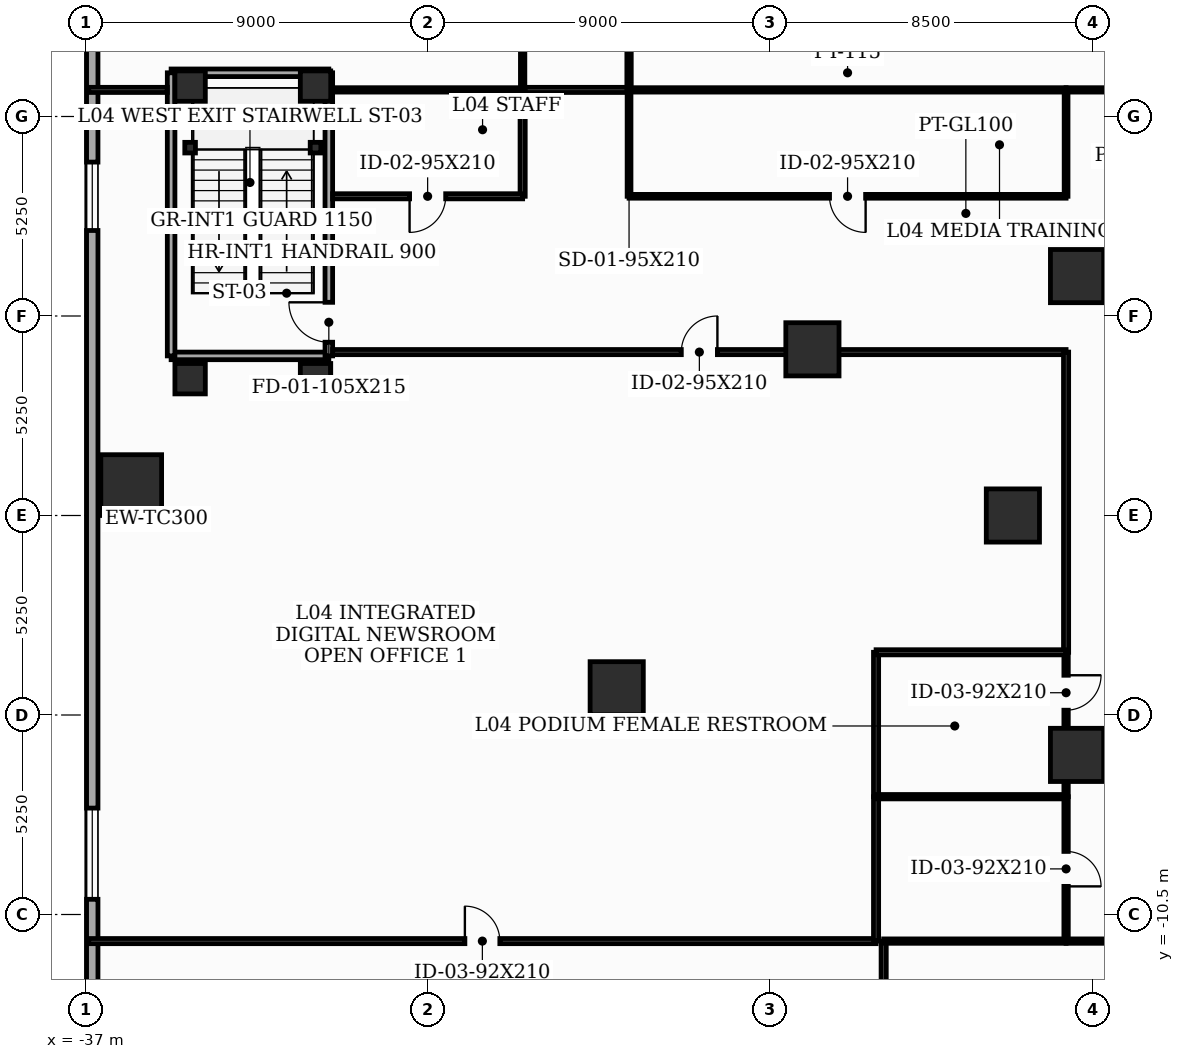
"""IFC4 building model, lengths in metres.
Left out: names, types, materials, properties, quantities, classifications, styles, units other than length and angle.
Written with IfcOpenShell. Run it as: python <this file> out.ifc"""

import sys

from ifc_helpers import new_model, si_unit, direction, frame, frame_2d, origin, origin_2d, place, context, subcontext, project, spatial, rectangle, i_section, extrude, element, fill, save


model = new_model("IFC4")
c1 = context("Model", 3, precision=1e-05, world=origin(), true_north=direction((0.0, 1.0)))
c2 = subcontext(c1, "Body", "Model", "MODEL_VIEW")
j1 = project(units=[si_unit("LENGTHUNIT", "METRE"), si_unit("PLANEANGLEUNIT", "RADIAN")], contexts=[c1])
p1 = place(None, origin())
s1 = spatial("IfcSite", under=j1, at=p1, CompositionType="ELEMENT")
p2 = place(p1, origin())
s2 = spatial("IfcBuilding", under=s1, at=p2, CompositionType="ELEMENT")
p3 = place(p2, frame((0.0, 0.0, 20.8)))
s3 = spatial("IfcBuildingStorey", under=s2, at=p3, CompositionType="ELEMENT", Elevation=20.8)
for number, where, z_axis, x_axis in (
    (1, (-10.912, 6.3, 0.0), (0.0, 0.0, 1.0), (1.0, 0.0, 0.0)),
    (2, (-12.6, 0.0, 0.0), (0.0, 0.0, 1.0), (1.0, 0.0, 0.0)),
    (3, (-10.912, -6.3, 0.0), (0.0, 0.0, 1.0), (1.0, 0.0, 0.0)),
):
    element("IfcColumn", number, at=place(p3, frame(where, z_axis=z_axis, x_axis=x_axis)), inside=s3, PredefinedType="COLUMN", context=c2, shape_type="SweptSolid", body=[
        extrude(rectangle(XDim=1.4, YDim=1.4, at=origin_2d()), origin(), (0.0, 0.0, 1.0), 5.2),
    ])
p4 = place(p3, frame((-35.8, 0.8, 0.0), z_axis=(0.0, 0.0, 1.0), x_axis=(1.0, 0.0, 0.0)))
e4 = element("IfcColumn", 4, at=p4, inside=s3, PredefinedType="COLUMN", context=c2, shape_type="SweptSolid", body=[
    extrude(rectangle(XDim=1.6, YDim=1.6, at=origin_2d()), origin(), (0.0, 0.0, 1.0), 5.2),
])
for number, where, z_axis, x_axis in (
    (5, (-17.875, 4.373, 0.0), (0.0, 0.0, 1.0), (1.0, 0.0, 0.0)),
    (6, (-23.025, -4.547, 0.0), (0.0, 0.0, 1.0), (1.0, 0.0, 0.0)),
):
    element("IfcColumn", number, at=place(p3, frame(where, z_axis=z_axis, x_axis=x_axis)), inside=s3, PredefinedType="COLUMN", context=c2, shape_type="SweptSolid", body=[
        extrude(rectangle(XDim=1.4, YDim=1.4, at=origin_2d()), origin(), (0.0, 0.0, 1.0), 5.2),
    ])
for number, where, z_axis, x_axis in (
    (7, (-34.25, 3.6, 0.0), (0.0, 0.0, 1.0), (1.0, 0.0, 0.0)),
    (8, (-30.95, 3.6, 0.0), (0.0, 0.0, 1.0), (1.0, 0.0, 0.0)),
    (9, (-30.95, 11.3, 0.0), (0.0, 0.0, 1.0), (1.0, 0.0, 0.0)),
    (10, (-34.25, 11.3, 0.0), (0.0, 0.0, 1.0), (1.0, 0.0, 0.0)),
):
    element("IfcColumn", number, at=place(p3, frame(where, z_axis=z_axis, x_axis=x_axis)), inside=s3, PredefinedType="COLUMN", context=c2, shape_type="SweptSolid", body=[
        extrude(rectangle(XDim=0.8, YDim=0.8, at=origin_2d()), origin(), (0.0, 0.0, 1.0), 5.2),
    ])
for number, where, z_axis, x_axis in (
    (11, (-34.25, 9.68, 0.0), (0.0, 0.0, 1.0), (1.0, 0.0, 0.0)),
    (12, (-30.95, 9.68, 0.0), (0.0, 0.0, 1.0), (1.0, 0.0, 0.0)),
):
    element("IfcColumn", number, at=place(p3, frame(where, z_axis=z_axis, x_axis=x_axis)), inside=s3, PredefinedType="PILASTER", context=c2, shape_type="SweptSolid", body=[
        extrude(i_section(OverallWidth=0.28, OverallDepth=0.28, WebThickness=0.01, FlangeThickness=0.018, at=origin_2d()), origin(), (0.0, 0.0, 1.0), 5.2),
    ])
p5 = place(p3, frame((-36.825, 28.5, 0.0), z_axis=(0.0, 0.0, 1.0), x_axis=(0.0, -1.0, 0.0)))
e13 = element("IfcWall", 13, at=p5, inside=s3, PredefinedType="SOLIDWALL", context=c2, shape_type="SweptSolid", body=[
    extrude(rectangle(XDim=48.0, YDim=0.3, at=frame_2d((24.0, 0.0))), origin(), (0.0, 0.0, 1.0), 4.94),
])
p6 = place(p5, frame((6.2, 0.0, 0.9)))
e14 = element("IfcOpeningElement", 14, at=p6, cuts=e13, PredefinedType="OPENING", context=c2, shape_type="SweptSolid", body=[
    extrude(rectangle(XDim=2.4, YDim=1.35, at=frame_2d((1.2, 0.675))), frame((0.0, 0.16, 0.0), z_axis=(0.0, -1.0, 0.0), x_axis=(1.0, 0.0, 0.0)), (0.0, 0.0, 1.0), 0.32),
])
p7 = place(p5, frame((19.2, 0.0, 0.9)))
e15 = element("IfcOpeningElement", 15, at=p7, cuts=e13, PredefinedType="OPENING", context=c2, shape_type="SweptSolid", body=[
    extrude(rectangle(XDim=1.8, YDim=1.35, at=frame_2d((0.9, 0.675))), frame((0.0, 0.16, 0.0), z_axis=(0.0, -1.0, 0.0), x_axis=(1.0, 0.0, 0.0)), (0.0, 0.0, 1.0), 0.32),
])
p8 = place(p5, frame((36.2, 0.0, 0.9)))
e16 = element("IfcOpeningElement", 16, at=p8, cuts=e13, PredefinedType="OPENING", context=c2, shape_type="SweptSolid", body=[
    extrude(rectangle(XDim=2.4, YDim=1.35, at=frame_2d((1.2, 0.675))), frame((0.0, 0.16, 0.0), z_axis=(0.0, -1.0, 0.0), x_axis=(1.0, 0.0, 0.0)), (0.0, 0.0, 1.0), 0.32),
])
p9 = place(p3, frame((-34.75, 4.2, 0.0), z_axis=(0.0, 0.0, 1.0), x_axis=(1.0, 0.0, 0.0)))
e17 = element("IfcWall", 17, at=p9, inside=s3, PredefinedType="SOLIDWALL", context=c2, shape_type="SweptSolid", body=[
    extrude(rectangle(XDim=4.15, YDim=0.2, at=frame_2d((2.075, 0.0))), origin(), (0.0, 0.0, 1.0), 4.94),
])
p10 = place(p3, frame((-30.6, 4.2, 0.0), z_axis=(0.0, 0.0, 1.0), x_axis=(0.0, 1.0, 0.0)))
e18 = element("IfcWall", 18, at=p10, inside=s3, PredefinedType="SOLIDWALL", context=c2, shape_type="SweptSolid", body=[
    extrude(rectangle(XDim=7.45, YDim=0.2, at=frame_2d((3.725, 0.0))), origin(), (0.0, 0.0, 1.0), 4.94),
])
p11 = place(p10, frame((0.36, 0.0, 0.0)))
e19 = element("IfcOpeningElement", 19, at=p11, cuts=e18, PredefinedType="OPENING", context=c2, shape_type="SweptSolid", body=[
    extrude(rectangle(XDim=1.05, YDim=2.15, at=frame_2d((0.525, 1.075))), frame((0.0, 0.11, 0.0), z_axis=(0.0, -1.0, 0.0), x_axis=(1.0, 0.0, 0.0)), (0.0, 0.0, 1.0), 0.22),
])
p12 = place(p3, frame((-30.6, 11.65, 0.0), z_axis=(0.0, 0.0, 1.0), x_axis=(-1.0, 0.0, 0.0)))
e20 = element("IfcWall", 20, at=p12, inside=s3, PredefinedType="SOLIDWALL", context=c2, shape_type="SweptSolid", body=[
    extrude(rectangle(XDim=4.15, YDim=0.2, at=frame_2d((2.075, 0.0))), origin(), (0.0, 0.0, 1.0), 4.94),
])
p13 = place(p3, frame((-34.75, 11.65, 0.0), z_axis=(0.0, 0.0, 1.0), x_axis=(0.0, -1.0, 0.0)))
e21 = element("IfcWall", 21, at=p13, inside=s3, PredefinedType="SOLIDWALL", context=c2, shape_type="SweptSolid", body=[
    extrude(rectangle(XDim=7.45, YDim=0.2, at=frame_2d((3.725, 0.0))), origin(), (0.0, 0.0, 1.0), 4.94),
])
p14 = place(p3, frame((-22.7, 11.2, 0.0), z_axis=(0.0, 0.0, 1.0), x_axis=(-1.0, 0.0, 0.0)))
e22 = element("IfcWall", 22, at=p14, inside=s3, PredefinedType="PARTITIONING", context=c2, shape_type="SweptSolid", body=[
    extrude(rectangle(XDim=2.8, YDim=0.135, at=frame_2d((1.4, 0.0))), origin(), (0.0, 0.0, 1.0), 4.94),
])
p15 = place(p3, frame((-30.5, 4.3, 0.0), z_axis=(0.0, 0.0, 1.0), x_axis=(1.0, 0.0, 0.0)))
e23 = element("IfcWall", 23, at=p15, inside=s3, PredefinedType="PARTITIONING", context=c2, shape_type="SweptSolid", body=[
    extrude(rectangle(XDim=19.3, YDim=0.135, at=frame_2d((9.65, 0.0))), origin(), (0.0, 0.0, 1.0), 3.525),
])
p16 = place(p15, frame((9.175, 0.0, 0.0)))
e24 = element("IfcOpeningElement", 24, at=p16, cuts=e23, PredefinedType="OPENING", context=c2, shape_type="SweptSolid", body=[
    extrude(rectangle(XDim=0.95, YDim=2.1, at=frame_2d((0.475, 1.05))), frame((0.0, 0.077, 0.0), z_axis=(0.0, -1.0, 0.0), x_axis=(1.0, 0.0, 0.0)), (0.0, 0.0, 1.0), 0.155),
])
p17 = place(p3, frame((-11.2, 4.3, 0.0), z_axis=(0.0, 0.0, 1.0), x_axis=(0.0, -1.0, 0.0)))
e25 = element("IfcWall", 25, at=p17, inside=s3, PredefinedType="PARTITIONING", context=c2, shape_type="SweptSolid", body=[
    extrude(rectangle(XDim=7.9, YDim=0.135, at=frame_2d((3.95, 0.0))), origin(), (0.0, 0.0, 1.0), 3.525),
])
p18 = place(p3, frame((-11.2, -3.6, 0.0), z_axis=(0.0, 0.0, 1.0), x_axis=(0.0, -1.0, 0.0)))
e26 = element("IfcWall", 26, at=p18, inside=s3, PredefinedType="PARTITIONING", context=c2, shape_type="SweptSolid", body=[
    extrude(rectangle(XDim=3.8, YDim=0.115, at=frame_2d((1.9, 0.0))), origin(), (0.0, 0.0, 1.0), 3.525),
])
p19 = place(p18, frame((0.604, 0.0, 0.0)))
e27 = element("IfcOpeningElement", 27, at=p19, cuts=e26, PredefinedType="OPENING", context=c2, shape_type="SweptSolid", body=[
    extrude(rectangle(XDim=0.92, YDim=2.1, at=frame_2d((0.46, 1.05))), frame((0.0, 0.067, 0.0), z_axis=(0.0, -1.0, 0.0), x_axis=(1.0, 0.0, 0.0)), (0.0, 0.0, 1.0), 0.135),
])
p20 = place(p3, frame((-11.2, -7.4, 0.0), z_axis=(0.0, 0.0, 1.0), x_axis=(0.0, -1.0, 0.0)))
e28 = element("IfcWall", 28, at=p20, inside=s3, PredefinedType="PARTITIONING", context=c2, shape_type="SweptSolid", body=[
    extrude(rectangle(XDim=3.8, YDim=0.115, at=frame_2d((1.9, 0.0))), origin(), (0.0, 0.0, 1.0), 4.94),
])
p21 = place(p20, frame((1.44, 0.0, 0.0)))
e29 = element("IfcOpeningElement", 29, at=p21, cuts=e28, PredefinedType="OPENING", context=c2, shape_type="SweptSolid", body=[
    extrude(rectangle(XDim=0.92, YDim=2.1, at=frame_2d((0.46, 1.05))), frame((0.0, 0.067, 0.0), z_axis=(0.0, -1.0, 0.0), x_axis=(1.0, 0.0, 0.0)), (0.0, 0.0, 1.0), 0.135),
])
p22 = place(p3, frame((-11.2, -11.2, 0.0), z_axis=(0.0, 0.0, 1.0), x_axis=(1.0, 0.0, 0.0)))
e30 = element("IfcWall", 30, at=p22, inside=s3, PredefinedType="PARTITIONING", context=c2, shape_type="SweptSolid", body=[
    extrude(rectangle(XDim=11.2, YDim=0.115, at=frame_2d((5.6, 0.0))), origin(), (0.0, 0.0, 1.0), 3.525),
])
p23 = place(p22, frame((7.589, 0.0, 0.0)))
e31 = element("IfcOpeningElement", 31, at=p23, cuts=e30, PredefinedType="OPENING", context=c2, shape_type="SweptSolid", body=[
    extrude(rectangle(XDim=0.95, YDim=2.1, at=frame_2d((0.475, 1.05))), frame((0.0, 0.067, 0.0), z_axis=(0.0, -1.0, 0.0), x_axis=(1.0, 0.0, 0.0)), (0.0, 0.0, 1.0), 0.135),
])
p24 = place(p3, frame((-10.0, 11.2, 0.0), z_axis=(0.0, 0.0, 1.0), x_axis=(-1.0, 0.0, 0.0)))
e32 = element("IfcWall", 32, at=p24, inside=s3, PredefinedType="PARTITIONING", context=c2, shape_type="SweptSolid", body=[
    extrude(rectangle(XDim=1.2, YDim=0.115, at=frame_2d((0.6, 0.0))), origin(), (0.0, 0.0, 1.0), 3.525),
])
p25 = place(p3, frame((-11.2, 11.2, 0.0), z_axis=(0.0, 0.0, 1.0), x_axis=(0.0, -1.0, 0.0)))
e33 = element("IfcWall", 33, at=p25, inside=s3, PredefinedType="MOVABLE", context=c2, shape_type="SweptSolid", body=[
    extrude(rectangle(XDim=2.8, YDim=0.1, at=frame_2d((1.4, 0.0))), origin(), (0.0, 0.0, 1.0), 3.525),
])
p26 = place(p3, frame((-11.2, 8.4, 0.0), z_axis=(0.0, 0.0, 1.0), x_axis=(-1.0, 0.0, 0.0)))
e34 = element("IfcWall", 34, at=p26, inside=s3, PredefinedType="MOVABLE", context=c2, shape_type="SweptSolid", body=[
    extrude(rectangle(XDim=11.5, YDim=0.1, at=frame_2d((5.75, 0.0))), origin(), (0.0, 0.0, 1.0), 3.525),
])
p27 = place(p26, frame((5.275, 0.0, 0.0)))
e35 = element("IfcOpeningElement", 35, at=p27, cuts=e34, PredefinedType="OPENING", context=c2, shape_type="SweptSolid", body=[
    extrude(rectangle(XDim=0.95, YDim=2.1, at=frame_2d((0.475, 1.05))), frame((0.0, 0.06, 0.0), z_axis=(0.0, -1.0, 0.0), x_axis=(1.0, 0.0, 0.0)), (0.0, 0.0, 1.0), 0.12),
])
p28 = place(p3, frame((-22.7, 8.4, 0.0), z_axis=(0.0, 0.0, 1.0), x_axis=(0.0, 1.0, 0.0)))
e36 = element("IfcWall", 36, at=p28, inside=s3, PredefinedType="MOVABLE", context=c2, shape_type="SweptSolid", body=[
    extrude(rectangle(XDim=2.8, YDim=0.1, at=frame_2d((1.4, 0.0))), origin(), (0.0, 0.0, 1.0), 4.94),
])
p29 = place(p3, frame((-25.5, 11.2, 0.0), z_axis=(0.0, 0.0, 1.0), x_axis=(0.0, -1.0, 0.0)))
e37 = element("IfcWall", 37, at=p29, inside=s3, PredefinedType="PARTITIONING", context=c2, shape_type="SweptSolid", body=[
    extrude(rectangle(XDim=2.8, YDim=0.135, at=frame_2d((1.4, 0.0))), origin(), (0.0, 0.0, 1.0), 4.94),
])
p30 = place(p3, frame((-25.5, 8.4, 0.0), z_axis=(0.0, 0.0, 1.0), x_axis=(-1.0, 0.0, 0.0)))
e38 = element("IfcWall", 38, at=p30, inside=s3, PredefinedType="PARTITIONING", context=c2, shape_type="SweptSolid", body=[
    extrude(rectangle(XDim=5.0, YDim=0.135, at=frame_2d((2.5, 0.0))), origin(), (0.0, 0.0, 1.0), 4.94),
])
p31 = place(p30, frame((2.025, 0.0, 0.0)))
e39 = element("IfcOpeningElement", 39, at=p31, cuts=e38, PredefinedType="OPENING", context=c2, shape_type="SweptSolid", body=[
    extrude(rectangle(XDim=0.95, YDim=2.1, at=frame_2d((0.475, 1.05))), frame((0.0, 0.077, 0.0), z_axis=(0.0, -1.0, 0.0), x_axis=(1.0, 0.0, 0.0)), (0.0, 0.0, 1.0), 0.155),
])
p32 = place(p3, frame((-25.5, 13.8, 0.0), z_axis=(0.0, 0.0, 1.0), x_axis=(0.0, -1.0, 0.0)))
e40 = element("IfcWall", 40, at=p32, inside=s3, PredefinedType="PARTITIONING", context=c2, shape_type="SweptSolid", body=[
    extrude(rectangle(XDim=2.6, YDim=0.115, at=frame_2d((1.3, 0.0))), origin(), (0.0, 0.0, 1.0), 4.425),
])
p33 = place(p3, frame((-22.7, 11.2, 0.0), z_axis=(0.0, 0.0, 1.0), x_axis=(0.0, 1.0, 0.0)))
e41 = element("IfcWall", 41, at=p33, inside=s3, PredefinedType="PARTITIONING", context=c2, shape_type="SweptSolid", body=[
    extrude(rectangle(XDim=7.0, YDim=0.115, at=frame_2d((3.5, 0.0))), origin(), (0.0, 0.0, 1.0), 4.425),
])
p34 = place(p33, frame((3.025, 0.0, 0.0)))
e42 = element("IfcOpeningElement", 42, at=p34, cuts=e41, PredefinedType="OPENING", context=c2, shape_type="SweptSolid", body=[
    extrude(rectangle(XDim=0.95, YDim=2.1, at=frame_2d((0.475, 1.05))), frame((0.0, 0.067, 0.0), z_axis=(0.0, -1.0, 0.0), x_axis=(1.0, 0.0, 0.0)), (0.0, 0.0, 1.0), 0.135),
])
p35 = place(p3, frame((-16.2, -7.4, 0.0), z_axis=(0.0, 0.0, 1.0), x_axis=(0.0, 1.0, 0.0)))
e43 = element("IfcWall", 43, at=p35, inside=s3, PredefinedType="PARTITIONING", context=c2, shape_type="SweptSolid", body=[
    extrude(rectangle(XDim=3.8, YDim=0.135, at=frame_2d((1.9, 0.0))), origin(), (0.0, 0.0, 1.0), 3.525),
])
p36 = place(p3, frame((-16.2, -3.6, 0.0), z_axis=(0.0, 0.0, 1.0), x_axis=(1.0, 0.0, 0.0)))
e44 = element("IfcWall", 44, at=p36, inside=s3, PredefinedType="PARTITIONING", context=c2, shape_type="SweptSolid", body=[
    extrude(rectangle(XDim=5.0, YDim=0.135, at=frame_2d((2.5, 0.0))), origin(), (0.0, 0.0, 1.0), 3.525),
])
p37 = place(p3, frame((-36.92, -11.2, 0.0), z_axis=(0.0, 0.0, 1.0), x_axis=(1.0, 0.0, 0.0)))
e45 = element("IfcWall", 45, at=p37, inside=s3, PredefinedType="PARTITIONING", context=c2, shape_type="SweptSolid", body=[
    extrude(rectangle(XDim=20.72, YDim=0.135, at=frame_2d((10.36, 0.0))), origin(), (0.0, 0.0, 1.0), 3.425),
])
p38 = place(p37, frame((9.9, 0.0, 0.0)))
e46 = element("IfcOpeningElement", 46, at=p38, cuts=e45, PredefinedType="OPENING", context=c2, shape_type="SweptSolid", body=[
    extrude(rectangle(XDim=0.92, YDim=2.1, at=frame_2d((0.46, 1.05))), frame((0.0, 0.077, 0.0), z_axis=(0.0, -1.0, 0.0), x_axis=(1.0, 0.0, 0.0)), (0.0, 0.0, 1.0), 0.155),
])
p39 = place(p3, frame((-16.2, -11.2, 0.0), z_axis=(0.0, 0.0, 1.0), x_axis=(0.0, 1.0, 0.0)))
e47 = element("IfcWall", 47, at=p39, inside=s3, PredefinedType="PARTITIONING", context=c2, shape_type="SweptSolid", body=[
    extrude(rectangle(XDim=3.8, YDim=0.135, at=frame_2d((1.9, 0.0))), origin(), (0.0, 0.0, 1.0), 4.94),
])
p40 = place(p3, frame((-34.85, 11.2, 0.0), z_axis=(0.0, 0.0, 1.0), x_axis=(-1.0, 0.0, 0.0)))
e48 = element("IfcWall", 48, at=p40, inside=s3, PredefinedType="PARTITIONING", context=c2, shape_type="SweptSolid", body=[
    extrude(rectangle(XDim=2.07, YDim=0.135, at=frame_2d((1.035, 0.0))), origin(), (0.0, 0.0, 1.0), 3.425),
])
p41 = place(p3, frame((-16.2, -7.4, 0.0), z_axis=(0.0, 0.0, 1.0), x_axis=(1.0, 0.0, 0.0)))
e49 = element("IfcWall", 49, at=p41, inside=s3, PredefinedType="PARTITIONING", context=c2, shape_type="SweptSolid", body=[
    extrude(rectangle(XDim=5.0, YDim=0.115, at=frame_2d((2.5, 0.0))), origin(), (0.0, 0.0, 1.0), 4.94),
])
p42 = place(p3, frame((-16.0, -24.42, 0.0), z_axis=(0.0, 0.0, 1.0), x_axis=(0.0, 1.0, 0.0)))
e50 = element("IfcWall", 50, at=p42, inside=s3, PredefinedType="PARTITIONING", context=c2, shape_type="SweptSolid", body=[
    extrude(rectangle(XDim=13.22, YDim=0.135, at=frame_2d((6.61, 0.0))), origin(), (0.0, 0.0, 1.0), 3.425),
])
p43 = place(p3, frame((-16.0, -11.2, 0.0), z_axis=(0.0, 0.0, 1.0), x_axis=(1.0, 0.0, 0.0)))
e51 = element("IfcWall", 51, at=p43, inside=s3, PredefinedType="PARTITIONING", context=c2, shape_type="SweptSolid", body=[
    extrude(rectangle(XDim=4.8, YDim=0.115, at=frame_2d((2.4, 0.0))), origin(), (0.0, 0.0, 1.0), 4.94),
])
p44 = place(p3, frame((-22.7, 11.2, 0.0), z_axis=(0.0, 0.0, 1.0), x_axis=(1.0, 0.0, 0.0)))
e52 = element("IfcWall", 52, at=p44, inside=s3, PredefinedType="PARTITIONING", context=c2, shape_type="SweptSolid", body=[
    extrude(rectangle(XDim=11.5, YDim=0.115, at=frame_2d((5.75, 0.0))), origin(), (0.0, 0.0, 1.0), 3.525),
])
p45 = place(p3, frame((-30.5, 11.2, 0.0), z_axis=(0.0, 0.0, 1.0), x_axis=(1.0, 0.0, 0.0)))
e53 = element("IfcWall", 53, at=p45, inside=s3, PredefinedType="PARTITIONING", context=c2, shape_type="SweptSolid", body=[
    extrude(rectangle(XDim=5.0, YDim=0.115, at=frame_2d((2.5, 0.0))), origin(), (0.0, 0.0, 1.0), 4.94),
])
p46 = place(p7, origin())
e54 = element("IfcWindow", 54, at=p46, inside=s3, PartitioningType="SINGLE_PANEL", PredefinedType="WINDOW", context=c2, shape_type="SweptSolid", body=[
    extrude(rectangle(XDim=1.8, YDim=1.35, at=frame_2d((0.9, 0.675))), frame((0.0, 0.03, 0.0), z_axis=(0.0, -1.0, 0.0), x_axis=(1.0, 0.0, 0.0)), (0.0, 0.0, 1.0), 0.06),
])
fill(e15, e54)
p47 = place(p8, origin())
e55 = element("IfcWindow", 55, at=p47, inside=s3, PartitioningType="SINGLE_PANEL", PredefinedType="WINDOW", context=c2, shape_type="SweptSolid", body=[
    extrude(rectangle(XDim=2.4, YDim=1.35, at=frame_2d((1.2, 0.675))), frame((0.0, 0.03, 0.0), z_axis=(0.0, -1.0, 0.0), x_axis=(1.0, 0.0, 0.0)), (0.0, 0.0, 1.0), 0.06),
])
fill(e16, e55)
p48 = place(p11, origin())
e56 = element("IfcDoor", 56, at=p48, inside=s3, OperationType="SINGLE_SWING_RIGHT", PredefinedType="DOOR", context=c2, shape_type="SweptSolid", body=[
    extrude(rectangle(XDim=1.05, YDim=2.15, at=frame_2d((0.525, 1.075))), frame((0.0, 0.025, 0.0), z_axis=(0.0, -1.0, 0.0), x_axis=(1.0, 0.0, 0.0)), (0.0, 0.0, 1.0), 0.05),
])
fill(e19, e56)
p49 = place(p16, origin())
e57 = element("IfcDoor", 57, at=p49, inside=s3, OperationType="SINGLE_SWING_RIGHT", PredefinedType="DOOR", context=c2, shape_type="SweptSolid", body=[
    extrude(rectangle(XDim=0.95, YDim=2.1, at=frame_2d((0.475, 1.05))), frame((0.0, 0.025, 0.0), z_axis=(0.0, -1.0, 0.0), x_axis=(1.0, 0.0, 0.0)), (0.0, 0.0, 1.0), 0.05),
])
fill(e24, e57)
p50 = place(p19, origin())
e58 = element("IfcDoor", 58, at=p50, inside=s3, OperationType="SINGLE_SWING_LEFT", PredefinedType="DOOR", context=c2, shape_type="SweptSolid", body=[
    extrude(rectangle(XDim=0.92, YDim=2.1, at=frame_2d((0.46, 1.05))), frame((0.0, 0.025, 0.0), z_axis=(0.0, -1.0, 0.0), x_axis=(1.0, 0.0, 0.0)), (0.0, 0.0, 1.0), 0.05),
])
fill(e27, e58)
p51 = place(p21, origin())
e59 = element("IfcDoor", 59, at=p51, inside=s3, OperationType="SINGLE_SWING_RIGHT", PredefinedType="DOOR", context=c2, shape_type="SweptSolid", body=[
    extrude(rectangle(XDim=0.92, YDim=2.1, at=frame_2d((0.46, 1.05))), frame((0.0, 0.025, 0.0), z_axis=(0.0, -1.0, 0.0), x_axis=(1.0, 0.0, 0.0)), (0.0, 0.0, 1.0), 0.05),
])
fill(e29, e59)
p52 = place(p27, origin())
e60 = element("IfcDoor", 60, at=p52, inside=s3, OperationType="SINGLE_SWING_LEFT", PredefinedType="DOOR", context=c2, shape_type="SweptSolid", body=[
    extrude(rectangle(XDim=0.95, YDim=2.1, at=frame_2d((0.475, 1.05))), frame((0.0, 0.025, 0.0), z_axis=(0.0, -1.0, 0.0), x_axis=(1.0, 0.0, 0.0)), (0.0, 0.0, 1.0), 0.05),
])
fill(e35, e60)
p53 = place(p31, origin())
e61 = element("IfcDoor", 61, at=p53, inside=s3, OperationType="SINGLE_SWING_RIGHT", PredefinedType="DOOR", context=c2, shape_type="SweptSolid", body=[
    extrude(rectangle(XDim=0.95, YDim=2.1, at=frame_2d((0.475, 1.05))), frame((0.0, 0.025, 0.0), z_axis=(0.0, -1.0, 0.0), x_axis=(1.0, 0.0, 0.0)), (0.0, 0.0, 1.0), 0.05),
])
fill(e39, e61)
p54 = place(p38, origin())
e62 = element("IfcDoor", 62, at=p54, inside=s3, OperationType="SINGLE_SWING_LEFT", PredefinedType="DOOR", context=c2, shape_type="SweptSolid", body=[
    extrude(rectangle(XDim=0.92, YDim=2.1, at=frame_2d((0.46, 1.05))), frame((0.0, 0.025, 0.0), z_axis=(0.0, -1.0, 0.0), x_axis=(1.0, 0.0, 0.0)), (0.0, 0.0, 1.0), 0.05),
])
fill(e46, e62)
save(model, sys.argv[1])
